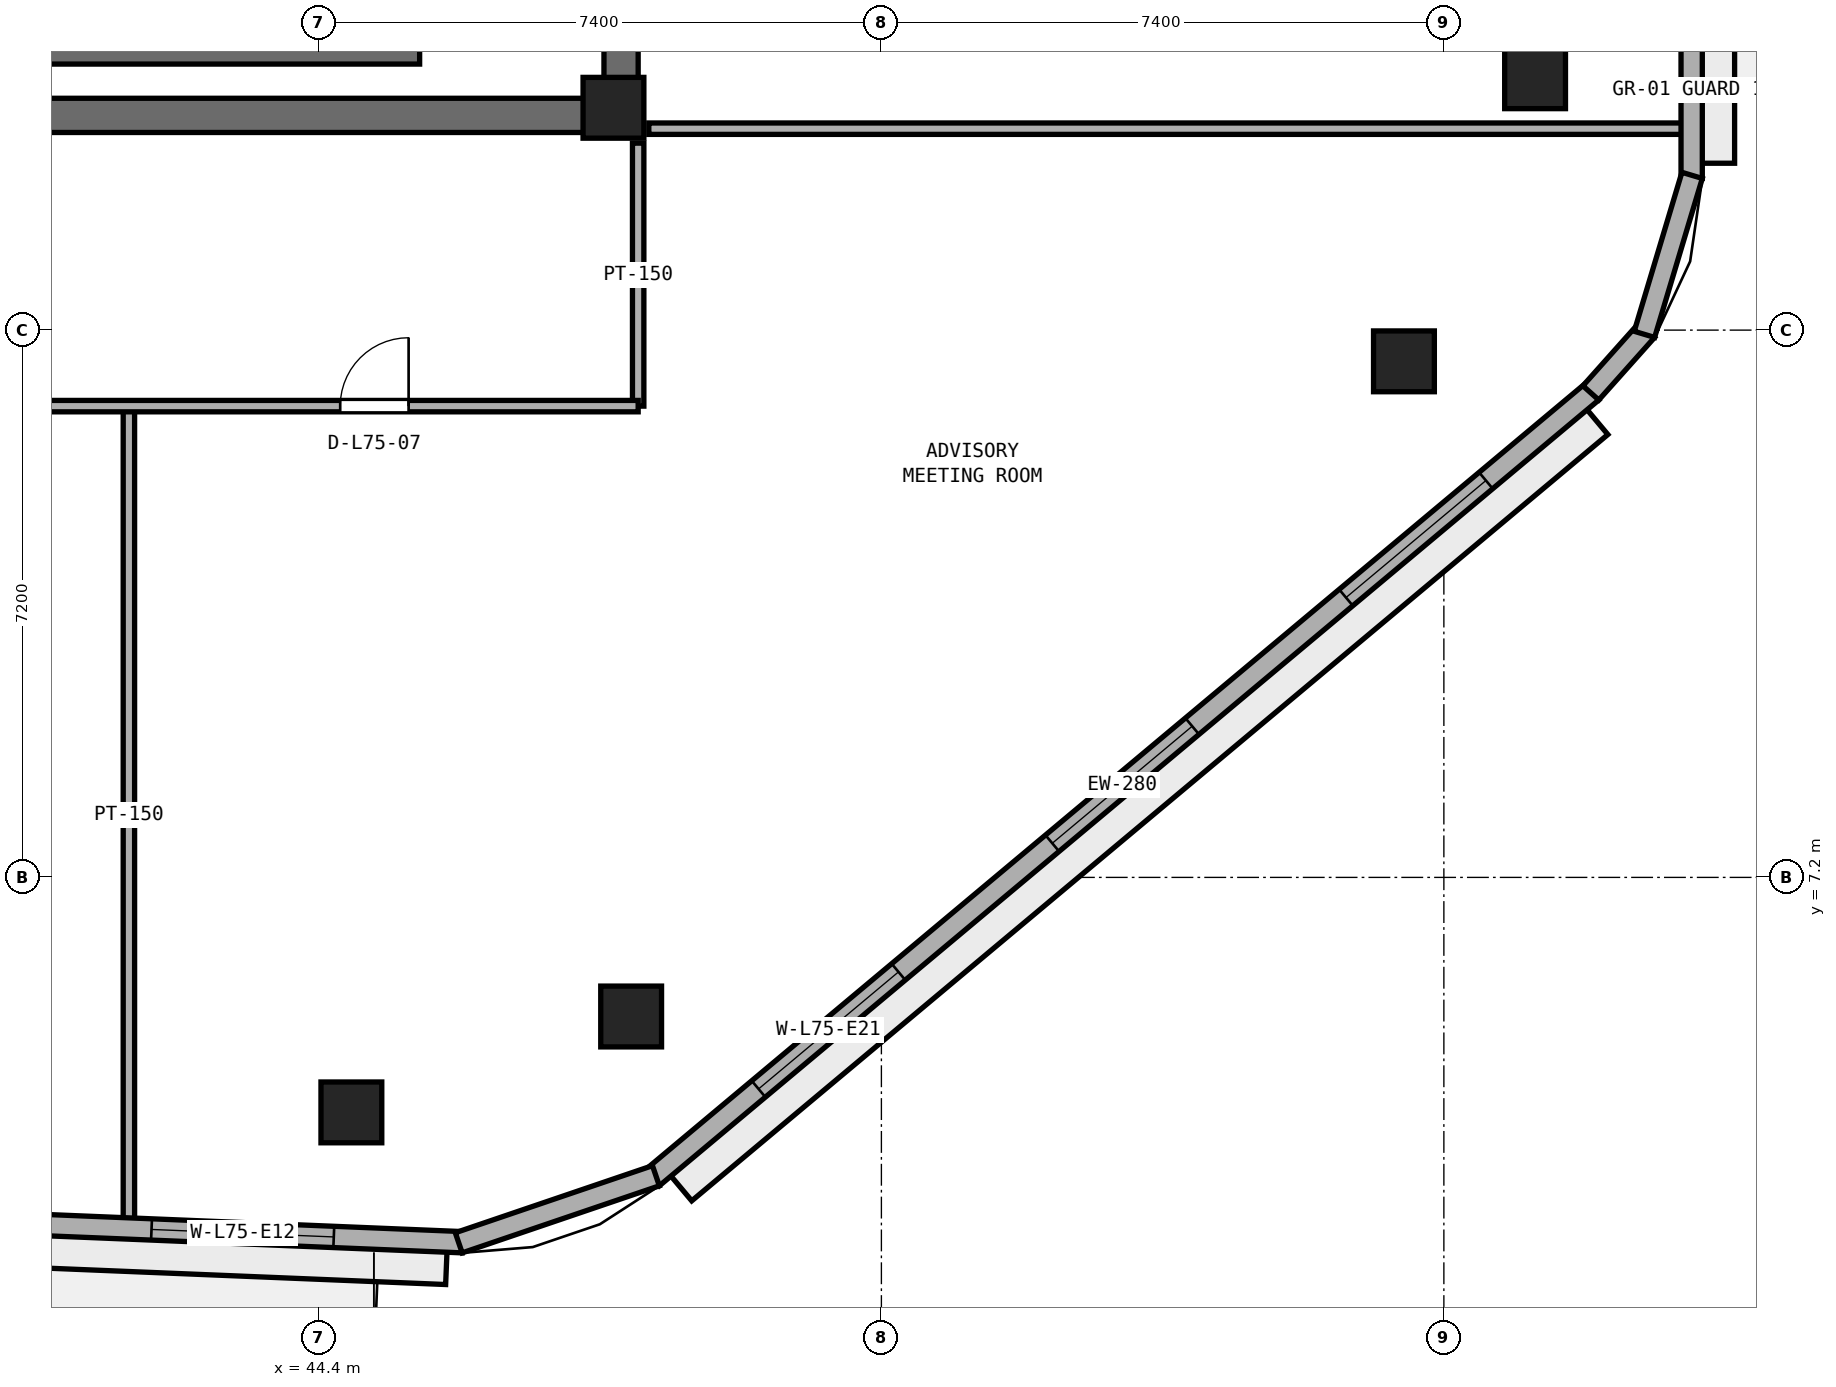
"""IFC4 building model, lengths in metres.
Left out: names, types, materials, properties, quantities, classifications, styles, units other than length and angle.
Written with IfcOpenShell. Run it as: python <this file> out.ifc"""

import sys

from ifc_helpers import new_model, si_unit, direction, frame, frame_2d, origin, origin_2d, place, context, subcontext, project, spatial, rectangle, extrude, element, fill, save


model = new_model("IFC4")
c1 = context("Model", 3, precision=1e-05, world=origin(), true_north=direction((0.0, 1.0)))
c2 = subcontext(c1, "Body", "Model", "MODEL_VIEW")
j1 = project(units=[si_unit("LENGTHUNIT", "METRE"), si_unit("PLANEANGLEUNIT", "RADIAN")], contexts=[c1])
p1 = place(None, origin())
s1 = spatial("IfcSite", under=j1, at=p1, CompositionType="ELEMENT")
p2 = place(p1, origin())
s2 = spatial("IfcBuilding", under=s1, at=p2, CompositionType="ELEMENT")
p3 = place(p2, frame((0.0, 0.0, 293.4)))
s3 = spatial("IfcBuildingStorey", under=s2, at=p3, CompositionType="ELEMENT", Elevation=293.4)
p4 = place(p3, frame((25.4, 17.225, 0.0), z_axis=(0.0, 0.0, 1.0), x_axis=(1.0, 0.0, 0.0)))
e1 = element("IfcWall", 1, at=p4, inside=s3, PredefinedType="SHEAR", context=c2, shape_type="SweptSolid", body=[
    extrude(rectangle(XDim=23.2, YDim=0.45, at=frame_2d((11.6, 0.0))), origin(), (0.0, 0.0, 1.0), 3.54),
])
p5 = place(p3, frame((48.375, 17.45, 0.0), z_axis=(0.0, 0.0, 1.0), x_axis=(0.0, 1.0, 0.0)))
e2 = element("IfcWall", 2, at=p5, inside=s3, PredefinedType="SHEAR", context=c2, shape_type="SweptSolid", body=[
    extrude(rectangle(XDim=15.5, YDim=0.45, at=frame_2d((7.75, 0.0))), origin(), (0.0, 0.0, 1.0), 3.54),
])
p6 = place(p5, frame((5.85, 0.0, 0.0)))
e3 = element("IfcOpeningElement", 3, at=p6, cuts=e2, PredefinedType="OPENING", context=c2, shape_type="SweptSolid", body=[
    extrude(rectangle(XDim=1.5, YDim=2.15, at=frame_2d((0.75, 1.075))), frame((0.0, 0.235, 0.0), z_axis=(0.0, -1.0, 0.0), x_axis=(1.0, 0.0, 0.0)), (0.0, 0.0, 1.0), 0.47),
])
p7 = place(p3, frame((48.275, 17.325, 0.0), z_axis=(0.0, 0.0, 1.0), x_axis=(1.0, 0.0, 0.0)))
e4 = element("IfcColumn", 4, at=p7, inside=s3, PredefinedType="PILASTER", context=c2, shape_type="SweptSolid", body=[
    extrude(rectangle(XDim=0.8, YDim=0.8, at=origin_2d()), origin(), (0.0, 0.0, 1.0), 3.8),
])
for number, where, z_axis, x_axis in (
    (5, (44.827, 4.108, 0.0), (0.0, 0.0, 1.0), (1.0, 0.0, 0.0)),
    (6, (48.508, 5.37, 0.0), (0.0, 0.0, 1.0), (1.0, 0.0, 0.0)),
    (7, (58.675, 13.989, 0.0), (0.0, 0.0, 1.0), (1.0, 0.0, 0.0)),
    (8, (60.4, 17.714, 0.0), (0.0, 0.0, 1.0), (1.0, 0.0, 0.0)),
):
    element("IfcColumn", number, at=place(p3, frame(where, z_axis=z_axis, x_axis=x_axis)), inside=s3, PredefinedType="COLUMN", context=c2, shape_type="SweptSolid", body=[
        extrude(rectangle(XDim=0.8, YDim=0.8, at=origin_2d()), origin(), (0.0, 0.0, 1.0), 3.8),
    ])
p8 = place(p3, frame((38.425, 18.025, 0.0), z_axis=(0.0, 0.0, 1.0), x_axis=(1.0, 0.0, 0.0)))
e9 = element("IfcWall", 9, at=p8, inside=s3, PredefinedType="SHEAR", context=c2, shape_type="SweptSolid", body=[
    extrude(rectangle(XDim=7.3, YDim=0.25, at=frame_2d((3.65, 0.0))), origin(), (0.0, 0.0, 1.0), 3.54),
])
p9 = place(p3, frame((48.6, 13.4, 0.0), z_axis=(0.0, 0.0, 1.0), x_axis=(0.0, 1.0, 0.0)))
e10 = element("IfcWall", 10, at=p9, inside=s3, PredefinedType="PARTITIONING", context=c2, shape_type="SweptSolid", body=[
    extrude(rectangle(XDim=3.46, YDim=0.15, at=frame_2d((1.73, 0.0))), origin(), (0.0, 0.0, 1.0), 3.54),
])
p10 = place(p3, frame((41.9, 2.646, 0.0), z_axis=(0.0, 0.0, 1.0), x_axis=(0.0, 1.0, 0.0)))
e11 = element("IfcWall", 11, at=p10, inside=s3, PredefinedType="PARTITIONING", context=c2, shape_type="SweptSolid", body=[
    extrude(rectangle(XDim=10.754, YDim=0.15, at=frame_2d((5.377, 0.0))), origin(), (0.0, 0.0, 1.0), 3.54),
])
p11 = place(p3, frame((21.8, 13.4, 0.0), z_axis=(0.0, 0.0, 1.0), x_axis=(1.0, 0.0, 0.0)))
e12 = element("IfcWall", 12, at=p11, inside=s3, PredefinedType="PARTITIONING", context=c2, shape_type="SweptSolid", body=[
    extrude(rectangle(XDim=26.8, YDim=0.15, at=frame_2d((13.4, 0.0))), origin(), (0.0, 0.0, 1.0), 3.54),
])
p12 = place(p11, frame((3.92, 0.0, 0.0)))
e13 = element("IfcOpeningElement", 13, at=p12, cuts=e12, PredefinedType="OPENING", context=c2, shape_type="SweptSolid", body=[
    extrude(rectangle(XDim=1.0, YDim=2.12, at=frame_2d((0.5, 1.06))), frame((0.0, 0.085, 0.0), z_axis=(0.0, -1.0, 0.0), x_axis=(1.0, 0.0, 0.0)), (0.0, 0.0, 1.0), 0.17),
])
p13 = place(p11, frame((13.85, 0.0, 0.0)))
e14 = element("IfcOpeningElement", 14, at=p13, cuts=e12, PredefinedType="OPENING", context=c2, shape_type="SweptSolid", body=[
    extrude(rectangle(XDim=1.0, YDim=2.12, at=frame_2d((0.5, 1.06))), frame((0.0, 0.085, 0.0), z_axis=(0.0, -1.0, 0.0), x_axis=(1.0, 0.0, 0.0)), (0.0, 0.0, 1.0), 0.17),
])
p14 = place(p11, frame((22.88, 0.0, 0.0)))
e15 = element("IfcOpeningElement", 15, at=p14, cuts=e12, PredefinedType="OPENING", context=c2, shape_type="SweptSolid", body=[
    extrude(rectangle(XDim=0.9, YDim=2.1, at=frame_2d((0.45, 1.05))), frame((0.0, 0.085, 0.0), z_axis=(0.0, -1.0, 0.0), x_axis=(1.0, 0.0, 0.0)), (0.0, 0.0, 1.0), 0.17),
])
p15 = place(p3, frame((48.74, 17.05, 0.0), z_axis=(0.0, 0.0, 1.0), x_axis=(1.0, 0.0, 0.0)))
e16 = element("IfcWall", 16, at=p15, inside=s3, PredefinedType="PARTITIONING", context=c2, shape_type="SweptSolid", body=[
    extrude(rectangle(XDim=13.655, YDim=0.15, at=frame_2d((6.828, 0.0))), origin(), (0.0, 0.0, 1.0), 2.923),
])
p16 = place(p3, frame((29.428, 3.093, 0.0), z_axis=(0.0, 0.0, 1.0), x_axis=(0.999156257967, -0.041070331944, 0.0)))
e17 = element("IfcWall", 17, at=p16, inside=s3, PredefinedType="STANDARD", context=c2, shape_type="SweptSolid", body=[
    extrude(rectangle(XDim=16.876, YDim=0.28, at=frame_2d((8.438, 0.0))), origin(), (0.0, 0.0, 1.0), 3.54),
])
p17 = place(p16, frame((7.888, 0.0, 0.0)))
e18 = element("IfcOpeningElement", 18, at=p17, cuts=e17, PredefinedType="OPENING", context=c2, shape_type="SweptSolid", body=[
    extrude(rectangle(XDim=1.1, YDim=2.2, at=frame_2d((0.55, 1.1))), frame((0.0, 0.15, 0.0), z_axis=(0.0, -1.0, 0.0), x_axis=(1.0, 0.0, 0.0)), (0.0, 0.0, 1.0), 0.3),
])
p18 = place(p16, frame((1.946, 0.0, 0.9)))
e19 = element("IfcOpeningElement", 19, at=p18, cuts=e17, PredefinedType="OPENING", context=c2, shape_type="SweptSolid", body=[
    extrude(rectangle(XDim=2.4, YDim=1.75, at=frame_2d((1.2, 0.875))), frame((0.0, 0.15, 0.0), z_axis=(0.0, -1.0, 0.0), x_axis=(1.0, 0.0, 0.0)), (0.0, 0.0, 1.0), 0.3),
])
p19 = place(p16, frame((12.78, 0.0, 0.9)))
e20 = element("IfcOpeningElement", 20, at=p19, cuts=e17, PredefinedType="OPENING", context=c2, shape_type="SweptSolid", body=[
    extrude(rectangle(XDim=2.4, YDim=1.75, at=frame_2d((1.2, 0.875))), frame((0.0, 0.15, 0.0), z_axis=(0.0, -1.0, 0.0), x_axis=(1.0, 0.0, 0.0)), (0.0, 0.0, 1.0), 0.3),
])
p20 = place(p3, frame((48.789, 3.25, 0.0), z_axis=(0.0, 0.0, 1.0), x_axis=(0.767032672101, 0.641608042288, 0.0)))
e21 = element("IfcWall", 21, at=p20, inside=s3, PredefinedType="STANDARD", context=c2, shape_type="SweptSolid", body=[
    extrude(rectangle(XDim=16.113, YDim=0.28, at=frame_2d((8.057, 0.0))), origin(), (0.0, 0.0, 1.0), 3.54),
])
p21 = place(p20, frame((1.819, 0.0, 0.9)))
e22 = element("IfcOpeningElement", 22, at=p21, cuts=e21, PredefinedType="OPENING", context=c2, shape_type="SweptSolid", body=[
    extrude(rectangle(XDim=2.4, YDim=1.75, at=frame_2d((1.2, 0.875))), frame((0.0, 0.15, 0.0), z_axis=(0.0, -1.0, 0.0), x_axis=(1.0, 0.0, 0.0)), (0.0, 0.0, 1.0), 0.3),
])
p22 = place(p20, frame((6.857, 0.0, 0.9)))
e23 = element("IfcOpeningElement", 23, at=p22, cuts=e21, PredefinedType="OPENING", context=c2, shape_type="SweptSolid", body=[
    extrude(rectangle(XDim=2.4, YDim=1.75, at=frame_2d((1.2, 0.875))), frame((0.0, 0.15, 0.0), z_axis=(0.0, -1.0, 0.0), x_axis=(1.0, 0.0, 0.0)), (0.0, 0.0, 1.0), 0.3),
])
p23 = place(p20, frame((11.895, 0.0, 0.9)))
e24 = element("IfcOpeningElement", 24, at=p23, cuts=e21, PredefinedType="OPENING", context=c2, shape_type="SweptSolid", body=[
    extrude(rectangle(XDim=2.4, YDim=1.75, at=frame_2d((1.2, 0.875))), frame((0.0, 0.15, 0.0), z_axis=(0.0, -1.0, 0.0), x_axis=(1.0, 0.0, 0.0)), (0.0, 0.0, 1.0), 0.3),
])
p24 = place(p3, frame((62.46, 16.396, 0.0), z_axis=(0.0, 0.0, 1.0), x_axis=(0.0, 1.0, 0.0)))
e25 = element("IfcWall", 25, at=p24, inside=s3, PredefinedType="STANDARD", context=c2, shape_type="SweptSolid", body=[
    extrude(rectangle(XDim=18.854, YDim=0.28, at=frame_2d((9.427, 0.0))), origin(), (0.0, 0.0, 1.0), 3.54),
])
p25 = place(p24, frame((8.877, 0.0, 0.0)))
e26 = element("IfcOpeningElement", 26, at=p25, cuts=e25, PredefinedType="OPENING", context=c2, shape_type="SweptSolid", body=[
    extrude(rectangle(XDim=1.1, YDim=2.2, at=frame_2d((0.55, 1.1))), frame((0.0, 0.15, 0.0), z_axis=(0.0, -1.0, 0.0), x_axis=(1.0, 0.0, 0.0)), (0.0, 0.0, 1.0), 0.3),
])
p26 = place(p24, frame((2.276, 0.0, 0.9)))
e27 = element("IfcOpeningElement", 27, at=p26, cuts=e25, PredefinedType="OPENING", context=c2, shape_type="SweptSolid", body=[
    extrude(rectangle(XDim=2.4, YDim=1.75, at=frame_2d((1.2, 0.875))), frame((0.0, 0.15, 0.0), z_axis=(0.0, -1.0, 0.0), x_axis=(1.0, 0.0, 0.0)), (0.0, 0.0, 1.0), 0.3),
])
p27 = place(p24, frame((14.179, 0.0, 0.9)))
e28 = element("IfcOpeningElement", 28, at=p27, cuts=e25, PredefinedType="OPENING", context=c2, shape_type="SweptSolid", body=[
    extrude(rectangle(XDim=2.4, YDim=1.75, at=frame_2d((1.2, 0.875))), frame((0.0, 0.15, 0.0), z_axis=(0.0, -1.0, 0.0), x_axis=(1.0, 0.0, 0.0)), (0.0, 0.0, 1.0), 0.3),
])
p28 = place(p3, frame((46.24, 2.393, 0.0), z_axis=(0.0, 0.0, 1.0), x_axis=(0.946759165502, 0.321942669643, 0.0)))
e29 = element("IfcWall", 29, at=p28, inside=s3, PredefinedType="STANDARD", context=c2, shape_type="SweptSolid", body=[
    extrude(rectangle(XDim=2.74, YDim=0.28, at=frame_2d((1.37, 0.0))), origin(), (0.0, 0.0, 1.0), 3.54),
])
p29 = place(p3, frame((61.134, 13.574, 0.0), z_axis=(0.0, 0.0, 1.0), x_axis=(0.665804679247, 0.74612608123, 0.0)))
e30 = element("IfcWall", 30, at=p29, inside=s3, PredefinedType="STANDARD", context=c2, shape_type="SweptSolid", body=[
    extrude(rectangle(XDim=1.103, YDim=0.28, at=frame_2d((0.552, 0.0))), origin(), (0.0, 0.0, 1.0), 3.54),
])
p30 = place(p3, frame((61.839, 14.344, 0.0), z_axis=(0.0, 0.0, 1.0), x_axis=(0.287235049694, 0.957860128739, 0.0)))
e31 = element("IfcWall", 31, at=p30, inside=s3, PredefinedType="STANDARD", context=c2, shape_type="SweptSolid", body=[
    extrude(rectangle(XDim=2.184, YDim=0.28, at=frame_2d((1.092, 0.0))), origin(), (0.0, 0.0, 1.0), 3.54),
])
p31 = place(p14, origin())
e32 = element("IfcDoor", 32, at=p31, inside=s3, OperationType="SINGLE_SWING_RIGHT", PredefinedType="DOOR", context=c2, shape_type="SweptSolid", body=[
    extrude(rectangle(XDim=0.9, YDim=2.1, at=frame_2d((0.45, 1.05))), frame((0.0, 0.025, 0.0), z_axis=(0.0, -1.0, 0.0), x_axis=(1.0, 0.0, 0.0)), (0.0, 0.0, 1.0), 0.05),
])
fill(e15, e32)
p32 = place(p19, origin())
e33 = element("IfcWindow", 33, at=p32, inside=s3, PartitioningType="SINGLE_PANEL", PredefinedType="WINDOW", context=c2, shape_type="SweptSolid", body=[
    extrude(rectangle(XDim=2.4, YDim=1.75, at=frame_2d((1.2, 0.875))), frame((0.0, 0.03, 0.0), z_axis=(0.0, -1.0, 0.0), x_axis=(1.0, 0.0, 0.0)), (0.0, 0.0, 1.0), 0.06),
])
fill(e20, e33)
p33 = place(p21, origin())
e34 = element("IfcWindow", 34, at=p33, inside=s3, PartitioningType="SINGLE_PANEL", PredefinedType="WINDOW", context=c2, shape_type="SweptSolid", body=[
    extrude(rectangle(XDim=2.4, YDim=1.75, at=frame_2d((1.2, 0.875))), frame((0.0, 0.03, 0.0), z_axis=(0.0, -1.0, 0.0), x_axis=(1.0, 0.0, 0.0)), (0.0, 0.0, 1.0), 0.06),
])
fill(e22, e34)
p34 = place(p22, origin())
e35 = element("IfcWindow", 35, at=p34, inside=s3, PartitioningType="SINGLE_PANEL", PredefinedType="WINDOW", context=c2, shape_type="SweptSolid", body=[
    extrude(rectangle(XDim=2.4, YDim=1.75, at=frame_2d((1.2, 0.875))), frame((0.0, 0.03, 0.0), z_axis=(0.0, -1.0, 0.0), x_axis=(1.0, 0.0, 0.0)), (0.0, 0.0, 1.0), 0.06),
])
fill(e23, e35)
p35 = place(p23, origin())
e36 = element("IfcWindow", 36, at=p35, inside=s3, PartitioningType="SINGLE_PANEL", PredefinedType="WINDOW", context=c2, shape_type="SweptSolid", body=[
    extrude(rectangle(XDim=2.4, YDim=1.75, at=frame_2d((1.2, 0.875))), frame((0.0, 0.03, 0.0), z_axis=(0.0, -1.0, 0.0), x_axis=(1.0, 0.0, 0.0)), (0.0, 0.0, 1.0), 0.06),
])
fill(e24, e36)
save(model, sys.argv[1])
